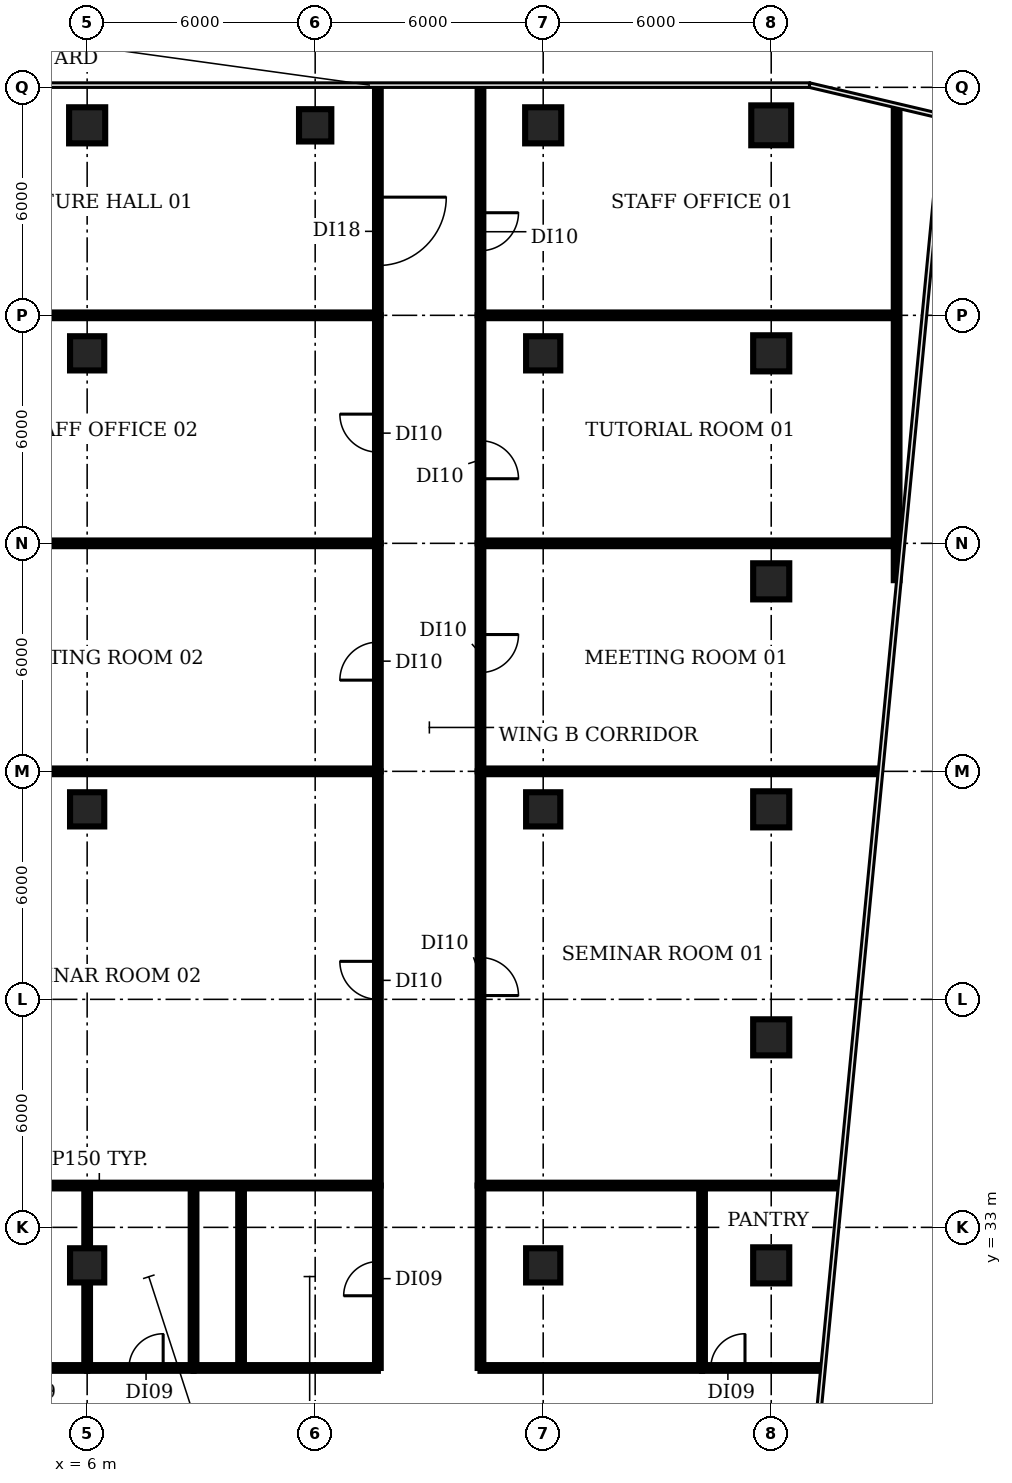
"""IFC4 building model, lengths in metres.
Left out: names, types, materials, properties, quantities, classifications, styles, units other than length and angle.
Written with IfcOpenShell. Run it as: python <this file> out.ifc"""

import sys

from ifc_helpers import new_model, si_unit, direction, frame, frame_2d, origin, origin_2d, place, context, subcontext, project, spatial, rectangle, circle, extrude, element, fill, save


model = new_model("IFC4")
c1 = context("Model", 3, precision=1e-05, world=origin(), true_north=direction((0.0, 1.0)))
c2 = subcontext(c1, "Body", "Model", "MODEL_VIEW")
j1 = project(units=[si_unit("LENGTHUNIT", "METRE"), si_unit("PLANEANGLEUNIT", "RADIAN")], contexts=[c1])
p1 = place(None, origin())
s1 = spatial("IfcSite", under=j1, at=p1, CompositionType="ELEMENT")
p2 = place(p1, origin())
s2 = spatial("IfcBuilding", under=s1, at=p2, CompositionType="ELEMENT")
p3 = place(p2, frame((0.0, 0.0, 146.6)))
s3 = spatial("IfcBuildingStorey", under=s2, at=p3, CompositionType="ELEMENT", Elevation=146.6)
for number, where, z_axis, x_axis in (
    (1, (6.0, 32.0, -0.35), (0.0, 0.0, 1.0), (1.0, 0.0, 0.0)),
    (2, (6.0, 44.0, -0.35), (0.0, 0.0, 1.0), (1.0, 0.0, 0.0)),
    (3, (6.0, 56.0, -0.35), (0.0, 0.0, 1.0), (1.0, 0.0, 0.0)),
):
    element("IfcColumn", number, at=place(p3, frame(where, z_axis=z_axis, x_axis=x_axis)), inside=s3, PredefinedType="COLUMN", context=c2, shape_type="SweptSolid", body=[
        extrude(rectangle(XDim=0.9, YDim=0.9, at=origin_2d()), origin(), (0.0, 0.0, 1.0), 4.2),
    ])
p4 = place(p3, frame((6.0, 62.0, -0.35), z_axis=(0.0, 0.0, 1.0), x_axis=(1.0, 0.0, 0.0)))
e4 = element("IfcColumn", 4, at=p4, inside=s3, PredefinedType="COLUMN", context=c2, shape_type="SweptSolid", body=[
    extrude(rectangle(XDim=0.95, YDim=0.95, at=origin_2d()), origin(), (0.0, 0.0, 1.0), 4.2),
])
p5 = place(p3, frame((12.0, 62.0, 0.0), z_axis=(0.0, 0.0, 1.0), x_axis=(1.0, 0.0, 0.0)))
e5 = element("IfcColumn", 5, at=p5, inside=s3, PredefinedType="COLUMN", context=c2, shape_type="SweptSolid", body=[
    extrude(rectangle(XDim=0.85, YDim=0.85, at=origin_2d()), origin(), (0.0, 0.0, 1.0), 3.85),
])
for number, where, z_axis, x_axis in (
    (6, (18.0, 32.0, -0.35), (0.0, 0.0, 1.0), (1.0, 0.0, 0.0)),
    (7, (18.0, 44.0, -0.35), (0.0, 0.0, 1.0), (1.0, 0.0, 0.0)),
    (8, (18.0, 56.0, -0.35), (0.0, 0.0, 1.0), (1.0, 0.0, 0.0)),
):
    element("IfcColumn", number, at=place(p3, frame(where, z_axis=z_axis, x_axis=x_axis)), inside=s3, PredefinedType="COLUMN", context=c2, shape_type="SweptSolid", body=[
        extrude(rectangle(XDim=0.9, YDim=0.9, at=origin_2d()), origin(), (0.0, 0.0, 1.0), 4.2),
    ])
for number, where, z_axis, x_axis in (
    (9, (18.0, 62.0, -0.35), (0.0, 0.0, 1.0), (1.0, 0.0, 0.0)),
    (10, (24.0, 32.0, -0.35), (0.0, 0.0, 1.0), (1.0, 0.0, 0.0)),
    (11, (24.0, 38.0, -0.35), (0.0, 0.0, 1.0), (1.0, 0.0, 0.0)),
    (12, (24.0, 44.0, -0.35), (0.0, 0.0, 1.0), (1.0, 0.0, 0.0)),
    (13, (24.0, 50.0, -0.35), (0.0, 0.0, 1.0), (1.0, 0.0, 0.0)),
    (14, (24.0, 56.0, -0.35), (0.0, 0.0, 1.0), (1.0, 0.0, 0.0)),
):
    element("IfcColumn", number, at=place(p3, frame(where, z_axis=z_axis, x_axis=x_axis)), inside=s3, PredefinedType="COLUMN", context=c2, shape_type="SweptSolid", body=[
        extrude(rectangle(XDim=0.95, YDim=0.95, at=origin_2d()), origin(), (0.0, 0.0, 1.0), 4.2),
    ])
p6 = place(p3, frame((24.0, 62.0, -0.35), z_axis=(0.0, 0.0, 1.0), x_axis=(1.0, 0.0, 0.0)))
e15 = element("IfcColumn", 15, at=p6, inside=s3, PredefinedType="COLUMN", context=c2, shape_type="SweptSolid", body=[
    extrude(circle(Radius=0.525, at=origin_2d()), origin(), (0.0, 0.0, 1.0), 4.2),
])
for number, where, z_axis, x_axis in (
    (16, (-1.01, 34.1, 0.0), (0.0, 0.0, 1.0), (1.0, 0.0, 0.0)),
    (17, (-1.01, 45.0, 0.0), (0.0, 0.0, 1.0), (1.0, 0.0, 0.0)),
    (18, (-1.01, 51.0, 0.0), (0.0, 0.0, 1.0), (1.0, 0.0, 0.0)),
):
    element("IfcWall", number, at=place(p3, frame(where, z_axis=z_axis, x_axis=x_axis)), inside=s3, PredefinedType="PARTITIONING", context=c2, shape_type="SweptSolid", body=[
        extrude(rectangle(XDim=14.66, YDim=0.15, at=frame_2d((7.33, 0.0))), origin(), (0.0, 0.0, 1.0), 2.88),
    ])
p7 = place(p3, frame((-0.993, 57.0, 0.0), z_axis=(0.0, 0.0, 1.0), x_axis=(1.0, 0.0, 0.0)))
e19 = element("IfcWall", 19, at=p7, inside=s3, PredefinedType="PARTITIONING", context=c2, shape_type="SweptSolid", body=[
    extrude(rectangle(XDim=14.643, YDim=0.15, at=frame_2d((7.321, 0.0))), origin(), (0.0, 0.0, 1.0), 2.88),
])
p8 = place(p3, frame((2.7, 29.3, 0.0), z_axis=(0.0, 0.0, 1.0), x_axis=(1.0, 0.0, 0.0)))
e20 = element("IfcWall", 20, at=p8, inside=s3, PredefinedType="PARTITIONING", context=c2, shape_type="SweptSolid", body=[
    extrude(rectangle(XDim=3.3, YDim=0.15, at=frame_2d((1.65, 0.0))), origin(), (0.0, 0.0, 1.0), 2.88),
])
p9 = place(p8, frame((1.3, 0.0, 0.0)))
e21 = element("IfcOpeningElement", 21, at=p9, cuts=e20, PredefinedType="OPENING", context=c2, shape_type="SweptSolid", body=[
    extrude(rectangle(XDim=0.9, YDim=2.1, at=frame_2d((0.45, 1.05))), frame((0.0, 0.085, 0.0), z_axis=(0.0, -1.0, 0.0), x_axis=(1.0, 0.0, 0.0)), (0.0, 0.0, 1.0), 0.17),
])
p10 = place(p3, frame((6.0, 29.3, 0.0), z_axis=(0.0, 0.0, 1.0), x_axis=(0.0, 1.0, 0.0)))
e22 = element("IfcWall", 22, at=p10, inside=s3, PredefinedType="PARTITIONING", context=c2, shape_type="SweptSolid", body=[
    extrude(rectangle(XDim=4.8, YDim=0.15, at=frame_2d((2.4, 0.0))), origin(), (0.0, 0.0, 1.0), 2.88),
])
p11 = place(p3, frame((6.0, 29.3, 0.0), z_axis=(0.0, 0.0, 1.0), x_axis=(1.0, 0.0, 0.0)))
e23 = element("IfcWall", 23, at=p11, inside=s3, PredefinedType="PARTITIONING", context=c2, shape_type="SweptSolid", body=[
    extrude(rectangle(XDim=2.8, YDim=0.15, at=frame_2d((1.4, 0.0))), origin(), (0.0, 0.0, 1.0), 2.88),
])
p12 = place(p11, frame((1.1, 0.0, 0.0)))
e24 = element("IfcOpeningElement", 24, at=p12, cuts=e23, PredefinedType="OPENING", context=c2, shape_type="SweptSolid", body=[
    extrude(rectangle(XDim=0.9, YDim=2.1, at=frame_2d((0.45, 1.05))), frame((0.0, 0.085, 0.0), z_axis=(0.0, -1.0, 0.0), x_axis=(1.0, 0.0, 0.0)), (0.0, 0.0, 1.0), 0.17),
])
p13 = place(p3, frame((8.8, 29.3, 0.0), z_axis=(0.0, 0.0, 1.0), x_axis=(0.0, 1.0, 0.0)))
e25 = element("IfcWall", 25, at=p13, inside=s3, PredefinedType="PARTITIONING", context=c2, shape_type="SweptSolid", body=[
    extrude(rectangle(XDim=4.8, YDim=0.15, at=frame_2d((2.4, 0.0))), origin(), (0.0, 0.0, 1.0), 2.88),
])
p14 = place(p3, frame((8.8, 29.3, 0.0), z_axis=(0.0, 0.0, 1.0), x_axis=(1.0, 0.0, 0.0)))
e26 = element("IfcWall", 26, at=p14, inside=s3, PredefinedType="PARTITIONING", context=c2, shape_type="SweptSolid", body=[
    extrude(rectangle(XDim=4.85, YDim=0.15, at=frame_2d((2.425, 0.0))), origin(), (0.0, 0.0, 1.0), 2.88),
])
p15 = place(p3, frame((10.05, 29.3, 0.0), z_axis=(0.0, 0.0, 1.0), x_axis=(0.0, 1.0, 0.0)))
e27 = element("IfcWall", 27, at=p15, inside=s3, PredefinedType="PARTITIONING", context=c2, shape_type="SweptSolid", body=[
    extrude(rectangle(XDim=4.8, YDim=0.15, at=frame_2d((2.4, 0.0))), origin(), (0.0, 0.0, 1.0), 2.88),
])
p16 = place(p3, frame((13.65, 29.3, 0.0), z_axis=(0.0, 0.0, 1.0), x_axis=(0.0, 1.0, 0.0)))
e28 = element("IfcWall", 28, at=p16, inside=s3, PredefinedType="PARTITIONING", context=c2, shape_type="SweptSolid", body=[
    extrude(rectangle(XDim=4.8, YDim=0.15, at=frame_2d((2.4, 0.0))), origin(), (0.0, 0.0, 1.0), 2.88),
])
p17 = place(p16, frame((1.9, 0.0, 0.0)))
e29 = element("IfcOpeningElement", 29, at=p17, cuts=e28, PredefinedType="OPENING", context=c2, shape_type="SweptSolid", body=[
    extrude(rectangle(XDim=0.9, YDim=2.1, at=frame_2d((0.45, 1.05))), frame((0.0, 0.085, 0.0), z_axis=(0.0, -1.0, 0.0), x_axis=(1.0, 0.0, 0.0)), (0.0, 0.0, 1.0), 0.17),
])
p18 = place(p3, frame((13.65, 34.1, 0.0), z_axis=(0.0, 0.0, 1.0), x_axis=(0.0, 1.0, 0.0)))
e30 = element("IfcWall", 30, at=p18, inside=s3, PredefinedType="PARTITIONING", context=c2, shape_type="SweptSolid", body=[
    extrude(rectangle(XDim=10.9, YDim=0.15, at=frame_2d((5.45, 0.0))), origin(), (0.0, 0.0, 1.0), 2.88),
])
p19 = place(p18, frame((4.9, 0.0, 0.0)))
e31 = element("IfcOpeningElement", 31, at=p19, cuts=e30, PredefinedType="OPENING", context=c2, shape_type="SweptSolid", body=[
    extrude(rectangle(XDim=1.0, YDim=2.1, at=frame_2d((0.5, 1.05))), frame((0.0, 0.085, 0.0), z_axis=(0.0, -1.0, 0.0), x_axis=(1.0, 0.0, 0.0)), (0.0, 0.0, 1.0), 0.17),
])
p20 = place(p3, frame((13.65, 45.0, 0.0), z_axis=(0.0, 0.0, 1.0), x_axis=(0.0, 1.0, 0.0)))
e32 = element("IfcWall", 32, at=p20, inside=s3, PredefinedType="PARTITIONING", context=c2, shape_type="SweptSolid", body=[
    extrude(rectangle(XDim=6.0, YDim=0.15, at=frame_2d((3.0, 0.0))), origin(), (0.0, 0.0, 1.0), 2.88),
])
p21 = place(p20, frame((2.4, 0.0, 0.0)))
e33 = element("IfcOpeningElement", 33, at=p21, cuts=e32, PredefinedType="OPENING", context=c2, shape_type="SweptSolid", body=[
    extrude(rectangle(XDim=1.0, YDim=2.1, at=frame_2d((0.5, 1.05))), frame((0.0, 0.085, 0.0), z_axis=(0.0, -1.0, 0.0), x_axis=(1.0, 0.0, 0.0)), (0.0, 0.0, 1.0), 0.17),
])
p22 = place(p3, frame((13.65, 51.0, 0.0), z_axis=(0.0, 0.0, 1.0), x_axis=(0.0, 1.0, 0.0)))
e34 = element("IfcWall", 34, at=p22, inside=s3, PredefinedType="PARTITIONING", context=c2, shape_type="SweptSolid", body=[
    extrude(rectangle(XDim=6.0, YDim=0.15, at=frame_2d((3.0, 0.0))), origin(), (0.0, 0.0, 1.0), 2.88),
])
p23 = place(p22, frame((2.4, 0.0, 0.0)))
e35 = element("IfcOpeningElement", 35, at=p23, cuts=e34, PredefinedType="OPENING", context=c2, shape_type="SweptSolid", body=[
    extrude(rectangle(XDim=1.0, YDim=2.1, at=frame_2d((0.5, 1.05))), frame((0.0, 0.085, 0.0), z_axis=(0.0, -1.0, 0.0), x_axis=(1.0, 0.0, 0.0)), (0.0, 0.0, 1.0), 0.17),
])
p24 = place(p3, frame((13.65, 63.01, 0.0), z_axis=(0.0, 0.0, 1.0), x_axis=(0.0, -1.0, 0.0)))
e36 = element("IfcWall", 36, at=p24, inside=s3, PredefinedType="PARTITIONING", context=c2, shape_type="SweptSolid", body=[
    extrude(rectangle(XDim=6.01, YDim=0.15, at=frame_2d((3.005, 0.0))), origin(), (0.0, 0.0, 1.0), 2.88),
])
p25 = place(p24, frame((2.9, 0.0, 0.0)))
e37 = element("IfcOpeningElement", 37, at=p25, cuts=e36, PredefinedType="OPENING", context=c2, shape_type="SweptSolid", body=[
    extrude(rectangle(XDim=1.8, YDim=2.1, at=frame_2d((0.9, 1.05))), frame((0.0, 0.085, 0.0), z_axis=(0.0, -1.0, 0.0), x_axis=(1.0, 0.0, 0.0)), (0.0, 0.0, 1.0), 0.17),
])
p26 = place(p3, frame((16.35, 29.3, 0.0), z_axis=(0.0, 0.0, 1.0), x_axis=(0.0, 1.0, 0.0)))
e38 = element("IfcWall", 38, at=p26, inside=s3, PredefinedType="PARTITIONING", context=c2, shape_type="SweptSolid", body=[
    extrude(rectangle(XDim=4.8, YDim=0.15, at=frame_2d((2.4, 0.0))), origin(), (0.0, 0.0, 1.0), 2.88),
])
p27 = place(p3, frame((16.35, 29.3, 0.0), z_axis=(0.0, 0.0, 1.0), x_axis=(1.0, 0.0, 0.0)))
e39 = element("IfcWall", 39, at=p27, inside=s3, PredefinedType="PARTITIONING", context=c2, shape_type="SweptSolid", body=[
    extrude(rectangle(XDim=5.83, YDim=0.15, at=frame_2d((2.915, 0.0))), origin(), (0.0, 0.0, 1.0), 2.88),
])
p28 = place(p3, frame((16.35, 34.1, 0.0), z_axis=(0.0, 0.0, 1.0), x_axis=(1.0, 0.0, 0.0)))
e40 = element("IfcWall", 40, at=p28, inside=s3, PredefinedType="PARTITIONING", context=c2, shape_type="SweptSolid", body=[
    extrude(rectangle(XDim=9.43, YDim=0.15, at=frame_2d((4.715, 0.0))), origin(), (0.0, 0.0, 1.0), 2.88),
])
p29 = place(p3, frame((16.35, 45.0, 0.0), z_axis=(0.0, 0.0, 1.0), x_axis=(0.0, -1.0, 0.0)))
e41 = element("IfcWall", 41, at=p29, inside=s3, PredefinedType="PARTITIONING", context=c2, shape_type="SweptSolid", body=[
    extrude(rectangle(XDim=10.9, YDim=0.15, at=frame_2d((5.45, 0.0))), origin(), (0.0, 0.0, 1.0), 2.88),
])
p30 = place(p29, frame((4.9, 0.0, 0.0)))
e42 = element("IfcOpeningElement", 42, at=p30, cuts=e41, PredefinedType="OPENING", context=c2, shape_type="SweptSolid", body=[
    extrude(rectangle(XDim=1.0, YDim=2.1, at=frame_2d((0.5, 1.05))), frame((0.0, 0.085, 0.0), z_axis=(0.0, -1.0, 0.0), x_axis=(1.0, 0.0, 0.0)), (0.0, 0.0, 1.0), 0.17),
])
p31 = place(p3, frame((16.35, 45.0, 0.0), z_axis=(0.0, 0.0, 1.0), x_axis=(1.0, 0.0, 0.0)))
e43 = element("IfcWall", 43, at=p31, inside=s3, PredefinedType="PARTITIONING", context=c2, shape_type="SweptSolid", body=[
    extrude(rectangle(XDim=10.48, YDim=0.15, at=frame_2d((5.24, 0.0))), origin(), (0.0, 0.0, 1.0), 2.88),
])
p32 = place(p3, frame((16.35, 51.0, 0.0), z_axis=(0.0, 0.0, 1.0), x_axis=(0.0, -1.0, 0.0)))
e44 = element("IfcWall", 44, at=p32, inside=s3, PredefinedType="PARTITIONING", context=c2, shape_type="SweptSolid", body=[
    extrude(rectangle(XDim=6.0, YDim=0.15, at=frame_2d((3.0, 0.0))), origin(), (0.0, 0.0, 1.0), 2.88),
])
p33 = place(p32, frame((2.4, 0.0, 0.0)))
e45 = element("IfcOpeningElement", 45, at=p33, cuts=e44, PredefinedType="OPENING", context=c2, shape_type="SweptSolid", body=[
    extrude(rectangle(XDim=1.0, YDim=2.1, at=frame_2d((0.5, 1.05))), frame((0.0, 0.085, 0.0), z_axis=(0.0, -1.0, 0.0), x_axis=(1.0, 0.0, 0.0)), (0.0, 0.0, 1.0), 0.17),
])
p34 = place(p3, frame((16.35, 51.0, 0.0), z_axis=(0.0, 0.0, 1.0), x_axis=(1.0, 0.0, 0.0)))
e46 = element("IfcWall", 46, at=p34, inside=s3, PredefinedType="PARTITIONING", context=c2, shape_type="SweptSolid", body=[
    extrude(rectangle(XDim=11.043, YDim=0.15, at=frame_2d((5.521, 0.0))), origin(), (0.0, 0.0, 1.0), 2.88),
])
p35 = place(p3, frame((16.35, 57.0, 0.0), z_axis=(0.0, 0.0, 1.0), x_axis=(0.0, -1.0, 0.0)))
e47 = element("IfcWall", 47, at=p35, inside=s3, PredefinedType="PARTITIONING", context=c2, shape_type="SweptSolid", body=[
    extrude(rectangle(XDim=6.0, YDim=0.15, at=frame_2d((3.0, 0.0))), origin(), (0.0, 0.0, 1.0), 2.88),
])
p36 = place(p35, frame((3.3, 0.0, 0.0)))
e48 = element("IfcOpeningElement", 48, at=p36, cuts=e47, PredefinedType="OPENING", context=c2, shape_type="SweptSolid", body=[
    extrude(rectangle(XDim=1.0, YDim=2.1, at=frame_2d((0.5, 1.05))), frame((0.0, 0.085, 0.0), z_axis=(0.0, -1.0, 0.0), x_axis=(1.0, 0.0, 0.0)), (0.0, 0.0, 1.0), 0.17),
])
p37 = place(p3, frame((16.35, 57.0, 0.0), z_axis=(0.0, 0.0, 1.0), x_axis=(1.0, 0.0, 0.0)))
e49 = element("IfcWall", 49, at=p37, inside=s3, PredefinedType="PARTITIONING", context=c2, shape_type="SweptSolid", body=[
    extrude(rectangle(XDim=10.95, YDim=0.15, at=frame_2d((5.475, 0.0))), origin(), (0.0, 0.0, 1.0), 2.88),
])
p38 = place(p3, frame((16.35, 63.01, 0.0), z_axis=(0.0, 0.0, 1.0), x_axis=(0.0, -1.0, 0.0)))
e50 = element("IfcWall", 50, at=p38, inside=s3, PredefinedType="PARTITIONING", context=c2, shape_type="SweptSolid", body=[
    extrude(rectangle(XDim=6.01, YDim=0.15, at=frame_2d((3.005, 0.0))), origin(), (0.0, 0.0, 1.0), 2.88),
])
p39 = place(p38, frame((3.31, 0.0, 0.0)))
e51 = element("IfcOpeningElement", 51, at=p39, cuts=e50, PredefinedType="OPENING", context=c2, shape_type="SweptSolid", body=[
    extrude(rectangle(XDim=1.0, YDim=2.1, at=frame_2d((0.5, 1.05))), frame((0.0, 0.085, 0.0), z_axis=(0.0, -1.0, 0.0), x_axis=(1.0, 0.0, 0.0)), (0.0, 0.0, 1.0), 0.17),
])
p40 = place(p3, frame((22.18, 29.3, 0.0), z_axis=(0.0, 0.0, 1.0), x_axis=(0.0, 1.0, 0.0)))
e52 = element("IfcWall", 52, at=p40, inside=s3, PredefinedType="PARTITIONING", context=c2, shape_type="SweptSolid", body=[
    extrude(rectangle(XDim=4.8, YDim=0.15, at=frame_2d((2.4, 0.0))), origin(), (0.0, 0.0, 1.0), 2.88),
])
p41 = place(p3, frame((22.18, 29.3, 0.0), z_axis=(0.0, 0.0, 1.0), x_axis=(1.0, 0.0, 0.0)))
e53 = element("IfcWall", 53, at=p41, inside=s3, PredefinedType="PARTITIONING", context=c2, shape_type="SweptSolid", body=[
    extrude(rectangle(XDim=3.13, YDim=0.15, at=frame_2d((1.565, 0.0))), origin(), (0.0, 0.0, 1.0), 2.88),
])
p42 = place(p41, frame((0.23, 0.0, 0.0)))
e54 = element("IfcOpeningElement", 54, at=p42, cuts=e53, PredefinedType="OPENING", context=c2, shape_type="SweptSolid", body=[
    extrude(rectangle(XDim=0.9, YDim=2.1, at=frame_2d((0.45, 1.05))), frame((0.0, 0.085, 0.0), z_axis=(0.0, -1.0, 0.0), x_axis=(1.0, 0.0, 0.0)), (0.0, 0.0, 1.0), 0.17),
])
p43 = place(p3, frame((27.3, 50.031, 0.0), z_axis=(0.0, 0.0, 1.0), x_axis=(0.0, 1.0, 0.0)))
e55 = element("IfcWall", 55, at=p43, inside=s3, PredefinedType="PARTITIONING", context=c2, shape_type="SweptSolid", body=[
    extrude(rectangle(XDim=12.439, YDim=0.15, at=frame_2d((6.22, 0.0))), origin(), (0.0, 0.0, 1.0), 2.88),
])
p44 = place(p12, origin())
e56 = element("IfcDoor", 56, at=p44, inside=s3, OperationType="SINGLE_SWING_RIGHT", PredefinedType="DOOR", context=c2, shape_type="SweptSolid", body=[
    extrude(rectangle(XDim=0.9, YDim=2.1, at=frame_2d((0.45, 1.05))), frame((0.0, 0.025, 0.0), z_axis=(0.0, -1.0, 0.0), x_axis=(1.0, 0.0, 0.0)), (0.0, 0.0, 1.0), 0.05),
])
fill(e24, e56)
p45 = place(p17, origin())
e57 = element("IfcDoor", 57, at=p45, inside=s3, OperationType="SINGLE_SWING_LEFT", PredefinedType="DOOR", context=c2, shape_type="SweptSolid", body=[
    extrude(rectangle(XDim=0.9, YDim=2.1, at=frame_2d((0.45, 1.05))), frame((0.0, 0.025, 0.0), z_axis=(0.0, -1.0, 0.0), x_axis=(1.0, 0.0, 0.0)), (0.0, 0.0, 1.0), 0.05),
])
fill(e29, e57)
p46 = place(p19, origin())
e58 = element("IfcDoor", 58, at=p46, inside=s3, OperationType="SINGLE_SWING_RIGHT", PredefinedType="DOOR", context=c2, shape_type="SweptSolid", body=[
    extrude(rectangle(XDim=1.0, YDim=2.1, at=frame_2d((0.5, 1.05))), frame((0.0, 0.025, 0.0), z_axis=(0.0, -1.0, 0.0), x_axis=(1.0, 0.0, 0.0)), (0.0, 0.0, 1.0), 0.05),
])
fill(e31, e58)
p47 = place(p21, origin())
e59 = element("IfcDoor", 59, at=p47, inside=s3, OperationType="SINGLE_SWING_LEFT", PredefinedType="DOOR", context=c2, shape_type="SweptSolid", body=[
    extrude(rectangle(XDim=1.0, YDim=2.1, at=frame_2d((0.5, 1.05))), frame((0.0, 0.025, 0.0), z_axis=(0.0, -1.0, 0.0), x_axis=(1.0, 0.0, 0.0)), (0.0, 0.0, 1.0), 0.05),
])
fill(e33, e59)
p48 = place(p23, origin())
e60 = element("IfcDoor", 60, at=p48, inside=s3, OperationType="SINGLE_SWING_RIGHT", PredefinedType="DOOR", context=c2, shape_type="SweptSolid", body=[
    extrude(rectangle(XDim=1.0, YDim=2.1, at=frame_2d((0.5, 1.05))), frame((0.0, 0.025, 0.0), z_axis=(0.0, -1.0, 0.0), x_axis=(1.0, 0.0, 0.0)), (0.0, 0.0, 1.0), 0.05),
])
fill(e35, e60)
p49 = place(p25, origin())
e61 = element("IfcDoor", 61, at=p49, inside=s3, OperationType="SINGLE_SWING_LEFT", PredefinedType="DOOR", context=c2, shape_type="SweptSolid", body=[
    extrude(rectangle(XDim=1.8, YDim=2.1, at=frame_2d((0.9, 1.05))), frame((0.0, 0.025, 0.0), z_axis=(0.0, -1.0, 0.0), x_axis=(1.0, 0.0, 0.0)), (0.0, 0.0, 1.0), 0.05),
])
fill(e37, e61)
p50 = place(p30, origin())
e62 = element("IfcDoor", 62, at=p50, inside=s3, OperationType="SINGLE_SWING_RIGHT", PredefinedType="DOOR", context=c2, shape_type="SweptSolid", body=[
    extrude(rectangle(XDim=1.0, YDim=2.1, at=frame_2d((0.5, 1.05))), frame((0.0, 0.025, 0.0), z_axis=(0.0, -1.0, 0.0), x_axis=(1.0, 0.0, 0.0)), (0.0, 0.0, 1.0), 0.05),
])
fill(e42, e62)
p51 = place(p33, origin())
e63 = element("IfcDoor", 63, at=p51, inside=s3, OperationType="SINGLE_SWING_LEFT", PredefinedType="DOOR", context=c2, shape_type="SweptSolid", body=[
    extrude(rectangle(XDim=1.0, YDim=2.1, at=frame_2d((0.5, 1.05))), frame((0.0, 0.025, 0.0), z_axis=(0.0, -1.0, 0.0), x_axis=(1.0, 0.0, 0.0)), (0.0, 0.0, 1.0), 0.05),
])
fill(e45, e63)
p52 = place(p36, origin())
e64 = element("IfcDoor", 64, at=p52, inside=s3, OperationType="SINGLE_SWING_RIGHT", PredefinedType="DOOR", context=c2, shape_type="SweptSolid", body=[
    extrude(rectangle(XDim=1.0, YDim=2.1, at=frame_2d((0.5, 1.05))), frame((0.0, 0.025, 0.0), z_axis=(0.0, -1.0, 0.0), x_axis=(1.0, 0.0, 0.0)), (0.0, 0.0, 1.0), 0.05),
])
fill(e48, e64)
p53 = place(p39, origin())
e65 = element("IfcDoor", 65, at=p53, inside=s3, OperationType="SINGLE_SWING_LEFT", PredefinedType="DOOR", context=c2, shape_type="SweptSolid", body=[
    extrude(rectangle(XDim=1.0, YDim=2.1, at=frame_2d((0.5, 1.05))), frame((0.0, 0.025, 0.0), z_axis=(0.0, -1.0, 0.0), x_axis=(1.0, 0.0, 0.0)), (0.0, 0.0, 1.0), 0.05),
])
fill(e51, e65)
p54 = place(p42, origin())
e66 = element("IfcDoor", 66, at=p54, inside=s3, OperationType="SINGLE_SWING_RIGHT", PredefinedType="DOOR", context=c2, shape_type="SweptSolid", body=[
    extrude(rectangle(XDim=0.9, YDim=2.1, at=frame_2d((0.45, 1.05))), frame((0.0, 0.025, 0.0), z_axis=(0.0, -1.0, 0.0), x_axis=(1.0, 0.0, 0.0)), (0.0, 0.0, 1.0), 0.05),
])
fill(e54, e66)
save(model, sys.argv[1])
